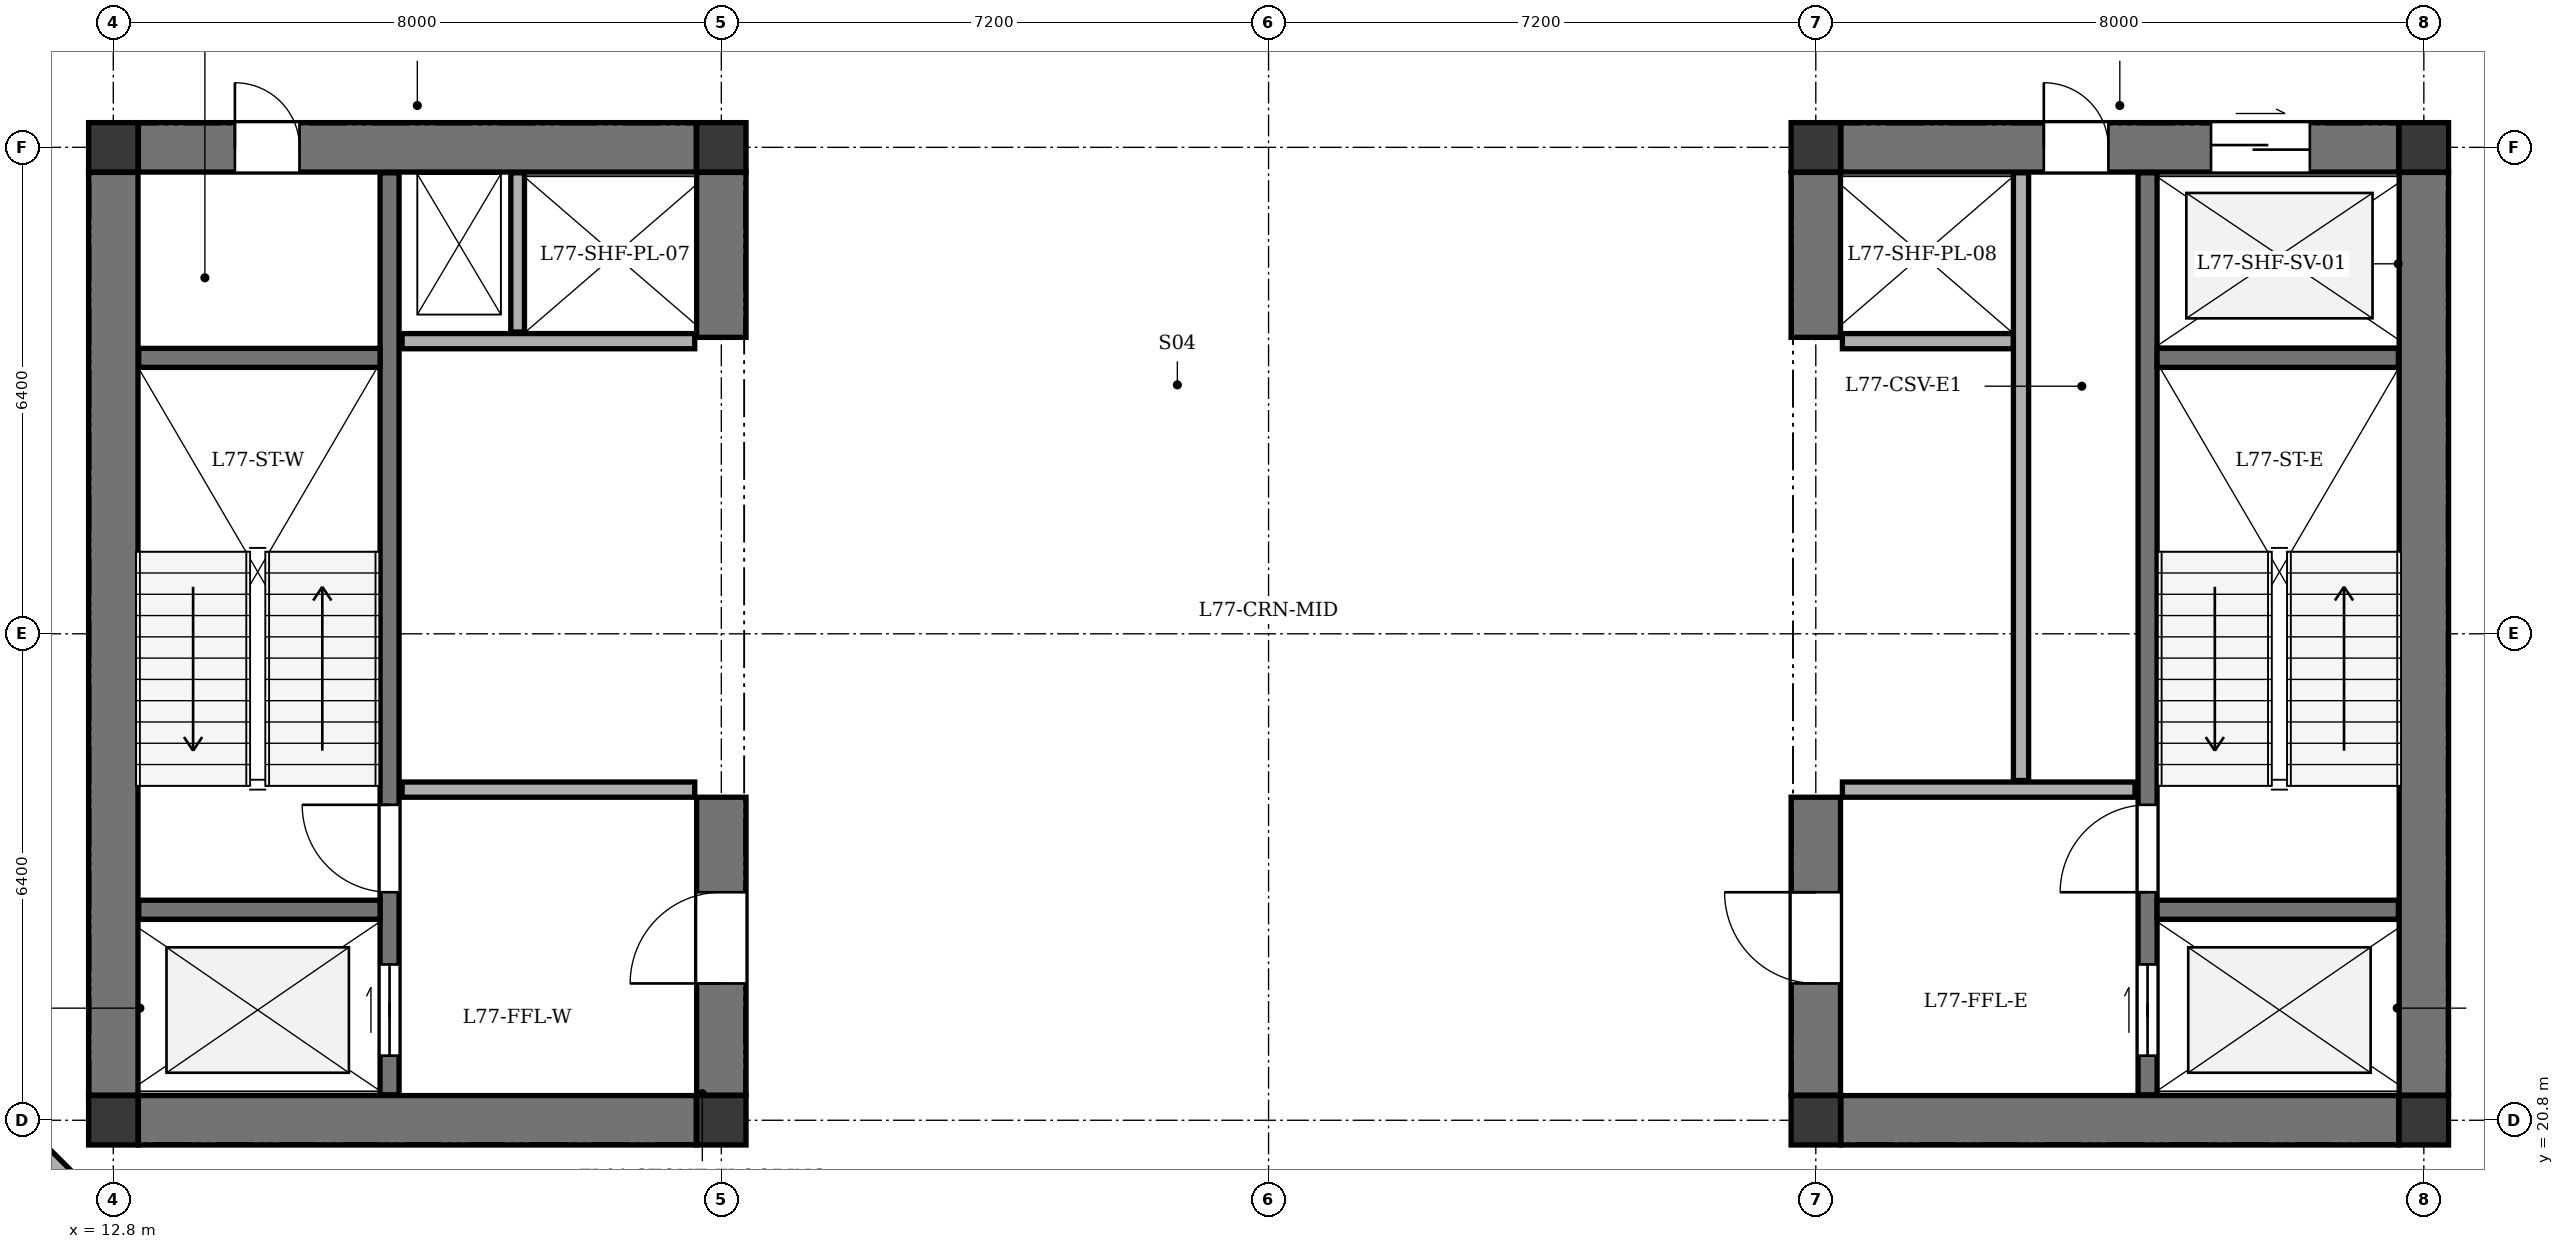
"""IFC4 building model, lengths in metres.
Left out: names, types, materials, properties, quantities, classifications, styles, units other than length and angle.
Written with IfcOpenShell. Run it as: python <this file> out.ifc"""

import sys

from ifc_helpers import new_model, si_unit, direction, frame, frame_2d, origin, origin_2d, place, context, subcontext, project, spatial, rectangle, extrude, element, fill, save


model = new_model("IFC4")
c1 = context("Model", 3, precision=1e-05, world=origin(), true_north=direction((0.0, 1.0)))
c2 = subcontext(c1, "Body", "Model", "MODEL_VIEW")
j1 = project(units=[si_unit("LENGTHUNIT", "METRE"), si_unit("PLANEANGLEUNIT", "RADIAN")], contexts=[c1])
p1 = place(None, origin())
s1 = spatial("IfcSite", under=j1, at=p1, CompositionType="ELEMENT")
p2 = place(p1, origin())
s2 = spatial("IfcBuilding", under=s1, at=p2, CompositionType="ELEMENT")
p3 = place(p2, frame((0.0, 0.0, 292.2)))
s3 = spatial("IfcBuildingStorey", under=s2, at=p3, CompositionType="ELEMENT", Elevation=292.2)
for number, where, z_axis, x_axis in (
    (1, (12.8, 20.8, 0.0), (0.0, 0.0, 1.0), (1.0, 0.0, 0.0)),
    (2, (20.8, 20.8, 0.0), (0.0, 0.0, 1.0), (1.0, 0.0, 0.0)),
    (3, (12.8, 33.6, 0.0), (0.0, 0.0, 1.0), (1.0, 0.0, 0.0)),
    (4, (20.8, 33.6, 0.0), (0.0, 0.0, 1.0), (1.0, 0.0, 0.0)),
    (5, (35.2, 20.8, 0.0), (0.0, 0.0, 1.0), (1.0, 0.0, 0.0)),
    (6, (43.2, 20.8, 0.0), (0.0, 0.0, 1.0), (1.0, 0.0, 0.0)),
    (7, (35.2, 33.6, 0.0), (0.0, 0.0, 1.0), (1.0, 0.0, 0.0)),
    (8, (43.2, 33.6, 0.0), (0.0, 0.0, 1.0), (1.0, 0.0, 0.0)),
):
    element("IfcColumn", number, at=place(p3, frame(where, z_axis=z_axis, x_axis=x_axis)), inside=s3, PredefinedType="COLUMN", context=c2, shape_type="SweptSolid", body=[
        extrude(rectangle(XDim=0.65, YDim=0.65, at=origin_2d()), origin(), (0.0, 0.0, 1.0), 4.2),
    ])
p4 = place(p3, frame((14.2, 17.97, 0.0), z_axis=(0.0, 0.0, 1.0), x_axis=(-0.707080859425, 0.707132701998, 0.0)))
e9 = element("IfcWall", 9, at=p4, inside=s3, PredefinedType="STANDARD", context=c2, shape_type="SweptSolid", body=[
    extrude(rectangle(XDim=4.709, YDim=0.3, at=frame_2d((2.354, 0.0))), origin(), (0.0, 0.0, 1.0), 3.545),
])
p5 = place(p3, frame((12.8, 21.13, 0.0), z_axis=(0.0, 0.0, 1.0), x_axis=(0.0, 1.0, 0.0)))
e10 = element("IfcWall", 10, at=p5, inside=s3, PredefinedType="SHEAR", context=c2, shape_type="SweptSolid", body=[
    extrude(rectangle(XDim=12.14, YDim=0.65, at=frame_2d((6.07, 0.0))), origin(), (0.0, 0.0, 1.0), 3.92),
])
p6 = place(p3, frame((13.13, 20.8, 0.0), z_axis=(0.0, 0.0, 1.0), x_axis=(1.0, 0.0, 0.0)))
e11 = element("IfcWall", 11, at=p6, inside=s3, PredefinedType="SHEAR", context=c2, shape_type="SweptSolid", body=[
    extrude(rectangle(XDim=7.34, YDim=0.65, at=frame_2d((3.67, 0.0))), origin(), (0.0, 0.0, 1.0), 3.92),
])
p7 = place(p3, frame((13.13, 33.6, 0.0), z_axis=(0.0, 0.0, 1.0), x_axis=(1.0, 0.0, 0.0)))
e12 = element("IfcWall", 12, at=p7, inside=s3, PredefinedType="SHEAR", context=c2, shape_type="SweptSolid", body=[
    extrude(rectangle(XDim=7.34, YDim=0.65, at=frame_2d((3.67, 0.0))), origin(), (0.0, 0.0, 1.0), 3.92),
])
p8 = place(p7, frame((1.27, 0.0, 0.0)))
e13 = element("IfcOpeningElement", 13, at=p8, cuts=e12, PredefinedType="OPENING", context=c2, shape_type="SweptSolid", body=[
    extrude(rectangle(XDim=0.85, YDim=2.02, at=frame_2d((0.425, 1.01))), frame((0.0, 0.335, 0.0), z_axis=(0.0, -1.0, 0.0), x_axis=(1.0, 0.0, 0.0)), (0.0, 0.0, 1.0), 0.67),
])
p9 = place(p3, frame((20.8, 21.13, 0.0), z_axis=(0.0, 0.0, 1.0), x_axis=(0.0, 1.0, 0.0)))
e14 = element("IfcWall", 14, at=p9, inside=s3, PredefinedType="SHEAR", context=c2, shape_type="SweptSolid", body=[
    extrude(rectangle(XDim=3.92, YDim=0.65, at=frame_2d((1.96, 0.0))), origin(), (0.0, 0.0, 1.0), 3.92),
])
p10 = place(p9, frame((1.47, 0.0, 0.0)))
e15 = element("IfcOpeningElement", 15, at=p10, cuts=e14, PredefinedType="OPENING", context=c2, shape_type="SweptSolid", body=[
    extrude(rectangle(XDim=1.2, YDim=2.15, at=frame_2d((0.6, 1.075))), frame((0.0, 0.335, 0.0), z_axis=(0.0, -1.0, 0.0), x_axis=(1.0, 0.0, 0.0)), (0.0, 0.0, 1.0), 0.67),
])
p11 = place(p3, frame((20.8, 31.1, 0.0), z_axis=(0.0, 0.0, 1.0), x_axis=(0.0, 1.0, 0.0)))
e16 = element("IfcWall", 16, at=p11, inside=s3, PredefinedType="SHEAR", context=c2, shape_type="SweptSolid", body=[
    extrude(rectangle(XDim=2.17, YDim=0.65, at=frame_2d((1.085, 0.0))), origin(), (0.0, 0.0, 1.0), 3.92),
])
p12 = place(p3, frame((16.435, 21.135, 0.0), z_axis=(0.0, 0.0, 1.0), x_axis=(0.0, 1.0, 0.0)))
e17 = element("IfcWall", 17, at=p12, inside=s3, PredefinedType="SHEAR", context=c2, shape_type="SweptSolid", body=[
    extrude(rectangle(XDim=12.13, YDim=0.25, at=frame_2d((6.065, 0.0))), origin(), (0.0, 0.0, 1.0), 3.92),
])
p13 = place(p12, frame((0.515, 0.0, 0.0)))
e18 = element("IfcOpeningElement", 18, at=p13, cuts=e17, PredefinedType="OPENING", context=c2, shape_type="SweptSolid", body=[
    extrude(rectangle(XDim=1.2, YDim=2.15, at=frame_2d((0.6, 1.075))), frame((0.0, 0.135, 0.0), z_axis=(0.0, -1.0, 0.0), x_axis=(1.0, 0.0, 0.0)), (0.0, 0.0, 1.0), 0.27),
])
p14 = place(p12, frame((2.665, 0.0, 0.0)))
e19 = element("IfcOpeningElement", 19, at=p14, cuts=e17, PredefinedType="OPENING", context=c2, shape_type="SweptSolid", body=[
    extrude(rectangle(XDim=1.15, YDim=2.15, at=frame_2d((0.575, 1.075))), frame((0.0, 0.135, 0.0), z_axis=(0.0, -1.0, 0.0), x_axis=(1.0, 0.0, 0.0)), (0.0, 0.0, 1.0), 0.27),
])
for number, where, z_axis, x_axis in (
    (20, (13.135, 23.57, 0.0), (0.0, 0.0, 1.0), (1.0, 0.0, 0.0)),
    (21, (13.135, 30.83, 0.0), (0.0, 0.0, 1.0), (1.0, 0.0, 0.0)),
):
    element("IfcWall", number, at=place(p3, frame(where, z_axis=z_axis, x_axis=x_axis)), inside=s3, PredefinedType="SHEAR", context=c2, shape_type="SweptSolid", body=[
        extrude(rectangle(XDim=3.175, YDim=0.25, at=frame_2d((1.587, 0.0))), origin(), (0.0, 0.0, 1.0), 3.92),
    ])
for number, where, z_axis, x_axis in (
    (22, (16.6, 25.15, 0.0), (0.0, 0.0, 1.0), (1.0, 0.0, 0.0)),
    (23, (16.6, 31.05, 0.0), (0.0, 0.0, 1.0), (1.0, 0.0, 0.0)),
):
    element("IfcWall", number, at=place(p3, frame(where, z_axis=z_axis, x_axis=x_axis)), inside=s3, PredefinedType="SOLIDWALL", context=c2, shape_type="SweptSolid", body=[
        extrude(rectangle(XDim=3.85, YDim=0.2, at=frame_2d((1.925, 0.0))), origin(), (0.0, 0.0, 1.0), 3.92),
    ])
p15 = place(p3, frame((18.12, 31.17, 0.0), z_axis=(0.0, 0.0, 1.0), x_axis=(0.0, 1.0, 0.0)))
e24 = element("IfcWall", 24, at=p15, inside=s3, PredefinedType="PARTITIONING", context=c2, shape_type="SweptSolid", body=[
    extrude(rectangle(XDim=2.095, YDim=0.18, at=frame_2d((1.047, 0.0))), origin(), (0.0, 0.0, 1.0), 3.92),
])
p16 = place(p3, frame((43.2, 21.13, 0.0), z_axis=(0.0, 0.0, 1.0), x_axis=(0.0, 1.0, 0.0)))
e25 = element("IfcWall", 25, at=p16, inside=s3, PredefinedType="SHEAR", context=c2, shape_type="SweptSolid", body=[
    extrude(rectangle(XDim=12.14, YDim=0.65, at=frame_2d((6.07, 0.0))), origin(), (0.0, 0.0, 1.0), 3.92),
])
p17 = place(p3, frame((35.53, 20.8, 0.0), z_axis=(0.0, 0.0, 1.0), x_axis=(1.0, 0.0, 0.0)))
e26 = element("IfcWall", 26, at=p17, inside=s3, PredefinedType="SHEAR", context=c2, shape_type="SweptSolid", body=[
    extrude(rectangle(XDim=7.34, YDim=0.65, at=frame_2d((3.67, 0.0))), origin(), (0.0, 0.0, 1.0), 3.92),
])
p18 = place(p3, frame((35.53, 33.6, 0.0), z_axis=(0.0, 0.0, 1.0), x_axis=(1.0, 0.0, 0.0)))
e27 = element("IfcWall", 27, at=p18, inside=s3, PredefinedType="SHEAR", context=c2, shape_type="SweptSolid", body=[
    extrude(rectangle(XDim=7.34, YDim=0.65, at=frame_2d((3.67, 0.0))), origin(), (0.0, 0.0, 1.0), 3.92),
])
p19 = place(p18, frame((4.87, 0.0, 0.0)))
e28 = element("IfcOpeningElement", 28, at=p19, cuts=e27, PredefinedType="OPENING", context=c2, shape_type="SweptSolid", body=[
    extrude(rectangle(XDim=1.3, YDim=2.15, at=frame_2d((0.65, 1.075))), frame((0.0, 0.335, 0.0), z_axis=(0.0, -1.0, 0.0), x_axis=(1.0, 0.0, 0.0)), (0.0, 0.0, 1.0), 0.67),
])
p20 = place(p18, frame((2.67, 0.0, 0.0)))
e29 = element("IfcOpeningElement", 29, at=p20, cuts=e27, PredefinedType="OPENING", context=c2, shape_type="SweptSolid", body=[
    extrude(rectangle(XDim=0.85, YDim=2.02, at=frame_2d((0.425, 1.01))), frame((0.0, 0.335, 0.0), z_axis=(0.0, -1.0, 0.0), x_axis=(1.0, 0.0, 0.0)), (0.0, 0.0, 1.0), 0.67),
])
p21 = place(p3, frame((35.2, 21.13, 0.0), z_axis=(0.0, 0.0, 1.0), x_axis=(0.0, 1.0, 0.0)))
e30 = element("IfcWall", 30, at=p21, inside=s3, PredefinedType="SHEAR", context=c2, shape_type="SweptSolid", body=[
    extrude(rectangle(XDim=3.92, YDim=0.65, at=frame_2d((1.96, 0.0))), origin(), (0.0, 0.0, 1.0), 3.92),
])
p22 = place(p21, frame((1.47, 0.0, 0.0)))
e31 = element("IfcOpeningElement", 31, at=p22, cuts=e30, PredefinedType="OPENING", context=c2, shape_type="SweptSolid", body=[
    extrude(rectangle(XDim=1.2, YDim=2.15, at=frame_2d((0.6, 1.075))), frame((0.0, 0.335, 0.0), z_axis=(0.0, -1.0, 0.0), x_axis=(1.0, 0.0, 0.0)), (0.0, 0.0, 1.0), 0.67),
])
p23 = place(p3, frame((35.2, 31.1, 0.0), z_axis=(0.0, 0.0, 1.0), x_axis=(0.0, 1.0, 0.0)))
e32 = element("IfcWall", 32, at=p23, inside=s3, PredefinedType="SHEAR", context=c2, shape_type="SweptSolid", body=[
    extrude(rectangle(XDim=2.17, YDim=0.65, at=frame_2d((1.085, 0.0))), origin(), (0.0, 0.0, 1.0), 3.92),
])
p24 = place(p3, frame((39.565, 21.135, 0.0), z_axis=(0.0, 0.0, 1.0), x_axis=(0.0, 1.0, 0.0)))
e33 = element("IfcWall", 33, at=p24, inside=s3, PredefinedType="SHEAR", context=c2, shape_type="SweptSolid", body=[
    extrude(rectangle(XDim=12.13, YDim=0.25, at=frame_2d((6.065, 0.0))), origin(), (0.0, 0.0, 1.0), 3.92),
])
p25 = place(p24, frame((0.515, 0.0, 0.0)))
e34 = element("IfcOpeningElement", 34, at=p25, cuts=e33, PredefinedType="OPENING", context=c2, shape_type="SweptSolid", body=[
    extrude(rectangle(XDim=1.2, YDim=2.15, at=frame_2d((0.6, 1.075))), frame((0.0, 0.135, 0.0), z_axis=(0.0, -1.0, 0.0), x_axis=(1.0, 0.0, 0.0)), (0.0, 0.0, 1.0), 0.27),
])
p26 = place(p24, frame((2.665, 0.0, 0.0)))
e35 = element("IfcOpeningElement", 35, at=p26, cuts=e33, PredefinedType="OPENING", context=c2, shape_type="SweptSolid", body=[
    extrude(rectangle(XDim=1.15, YDim=2.15, at=frame_2d((0.575, 1.075))), frame((0.0, 0.135, 0.0), z_axis=(0.0, -1.0, 0.0), x_axis=(1.0, 0.0, 0.0)), (0.0, 0.0, 1.0), 0.27),
])
for number, where, z_axis, x_axis in (
    (36, (39.69, 23.57, 0.0), (0.0, 0.0, 1.0), (1.0, 0.0, 0.0)),
    (37, (39.69, 30.83, 0.0), (0.0, 0.0, 1.0), (1.0, 0.0, 0.0)),
):
    element("IfcWall", number, at=place(p3, frame(where, z_axis=z_axis, x_axis=x_axis)), inside=s3, PredefinedType="SHEAR", context=c2, shape_type="SweptSolid", body=[
        extrude(rectangle(XDim=3.175, YDim=0.25, at=frame_2d((1.587, 0.0))), origin(), (0.0, 0.0, 1.0), 3.92),
    ])
p27 = place(p3, frame((35.55, 25.15, 0.0), z_axis=(0.0, 0.0, 1.0), x_axis=(1.0, 0.0, 0.0)))
e38 = element("IfcWall", 38, at=p27, inside=s3, PredefinedType="SOLIDWALL", context=c2, shape_type="SweptSolid", body=[
    extrude(rectangle(XDim=3.85, YDim=0.2, at=frame_2d((1.925, 0.0))), origin(), (0.0, 0.0, 1.0), 3.92),
])
p28 = place(p3, frame((35.55, 31.05, 0.0), z_axis=(0.0, 0.0, 1.0), x_axis=(1.0, 0.0, 0.0)))
e39 = element("IfcWall", 39, at=p28, inside=s3, PredefinedType="SOLIDWALL", context=c2, shape_type="SweptSolid", body=[
    extrude(rectangle(XDim=2.25, YDim=0.2, at=frame_2d((1.125, 0.0))), origin(), (0.0, 0.0, 1.0), 3.92),
])
p29 = place(p3, frame((37.9, 25.27, 0.0), z_axis=(0.0, 0.0, 1.0), x_axis=(0.0, 1.0, 0.0)))
e40 = element("IfcWall", 40, at=p29, inside=s3, PredefinedType="SOLIDWALL", context=c2, shape_type="SweptSolid", body=[
    extrude(rectangle(XDim=7.995, YDim=0.2, at=frame_2d((3.998, 0.0))), origin(), (0.0, 0.0, 1.0), 3.92),
])
p30 = place(p8, origin())
e41 = element("IfcDoor", 41, at=p30, inside=s3, OperationType="SINGLE_SWING_LEFT", PredefinedType="DOOR", context=c2, shape_type="SweptSolid", body=[
    extrude(rectangle(XDim=0.85, YDim=2.02, at=frame_2d((0.425, 1.01))), frame((0.0, 0.025, 0.0), z_axis=(0.0, -1.0, 0.0), x_axis=(1.0, 0.0, 0.0)), (0.0, 0.0, 1.0), 0.05),
])
fill(e13, e41)
p31 = place(p10, origin())
e42 = element("IfcDoor", 42, at=p31, inside=s3, OperationType="SINGLE_SWING_LEFT", PredefinedType="DOOR", context=c2, shape_type="SweptSolid", body=[
    extrude(rectangle(XDim=1.2, YDim=2.15, at=frame_2d((0.6, 1.075))), frame((0.0, 0.025, 0.0), z_axis=(0.0, -1.0, 0.0), x_axis=(1.0, 0.0, 0.0)), (0.0, 0.0, 1.0), 0.05),
])
fill(e15, e42)
p32 = place(p13, origin())
e43 = element("IfcDoor", 43, at=p32, inside=s3, OperationType="DOUBLE_DOOR_SLIDING", PredefinedType="DOOR", context=c2, shape_type="SweptSolid", body=[
    extrude(rectangle(XDim=1.2, YDim=2.15, at=frame_2d((0.6, 1.075))), frame((0.0, 0.025, 0.0), z_axis=(0.0, -1.0, 0.0), x_axis=(1.0, 0.0, 0.0)), (0.0, 0.0, 1.0), 0.05),
])
fill(e18, e43)
p33 = place(p14, origin())
e44 = element("IfcDoor", 44, at=p33, inside=s3, OperationType="SINGLE_SWING_RIGHT", PredefinedType="DOOR", context=c2, shape_type="SweptSolid", body=[
    extrude(rectangle(XDim=1.15, YDim=2.15, at=frame_2d((0.575, 1.075))), frame((0.0, 0.025, 0.0), z_axis=(0.0, -1.0, 0.0), x_axis=(1.0, 0.0, 0.0)), (0.0, 0.0, 1.0), 0.05),
])
fill(e19, e44)
p34 = place(p19, origin())
e45 = element("IfcDoor", 45, at=p34, inside=s3, OperationType="DOUBLE_DOOR_SLIDING", PredefinedType="DOOR", context=c2, shape_type="SweptSolid", body=[
    extrude(rectangle(XDim=1.3, YDim=2.15, at=frame_2d((0.65, 1.075))), frame((0.0, 0.025, 0.0), z_axis=(0.0, -1.0, 0.0), x_axis=(1.0, 0.0, 0.0)), (0.0, 0.0, 1.0), 0.05),
])
fill(e28, e45)
p35 = place(p20, origin())
e46 = element("IfcDoor", 46, at=p35, inside=s3, OperationType="SINGLE_SWING_LEFT", PredefinedType="DOOR", context=c2, shape_type="SweptSolid", body=[
    extrude(rectangle(XDim=0.85, YDim=2.02, at=frame_2d((0.425, 1.01))), frame((0.0, 0.025, 0.0), z_axis=(0.0, -1.0, 0.0), x_axis=(1.0, 0.0, 0.0)), (0.0, 0.0, 1.0), 0.05),
])
fill(e29, e46)
p36 = place(p22, origin())
e47 = element("IfcDoor", 47, at=p36, inside=s3, OperationType="SINGLE_SWING_RIGHT", PredefinedType="DOOR", context=c2, shape_type="SweptSolid", body=[
    extrude(rectangle(XDim=1.2, YDim=2.15, at=frame_2d((0.6, 1.075))), frame((0.0, 0.025, 0.0), z_axis=(0.0, -1.0, 0.0), x_axis=(1.0, 0.0, 0.0)), (0.0, 0.0, 1.0), 0.05),
])
fill(e31, e47)
p37 = place(p25, origin())
e48 = element("IfcDoor", 48, at=p37, inside=s3, OperationType="DOUBLE_DOOR_SLIDING", PredefinedType="DOOR", context=c2, shape_type="SweptSolid", body=[
    extrude(rectangle(XDim=1.2, YDim=2.15, at=frame_2d((0.6, 1.075))), frame((0.0, 0.025, 0.0), z_axis=(0.0, -1.0, 0.0), x_axis=(1.0, 0.0, 0.0)), (0.0, 0.0, 1.0), 0.05),
])
fill(e34, e48)
p38 = place(p26, origin())
e49 = element("IfcDoor", 49, at=p38, inside=s3, OperationType="SINGLE_SWING_LEFT", PredefinedType="DOOR", context=c2, shape_type="SweptSolid", body=[
    extrude(rectangle(XDim=1.15, YDim=2.15, at=frame_2d((0.575, 1.075))), frame((0.0, 0.025, 0.0), z_axis=(0.0, -1.0, 0.0), x_axis=(1.0, 0.0, 0.0)), (0.0, 0.0, 1.0), 0.05),
])
fill(e35, e49)
save(model, sys.argv[1])
